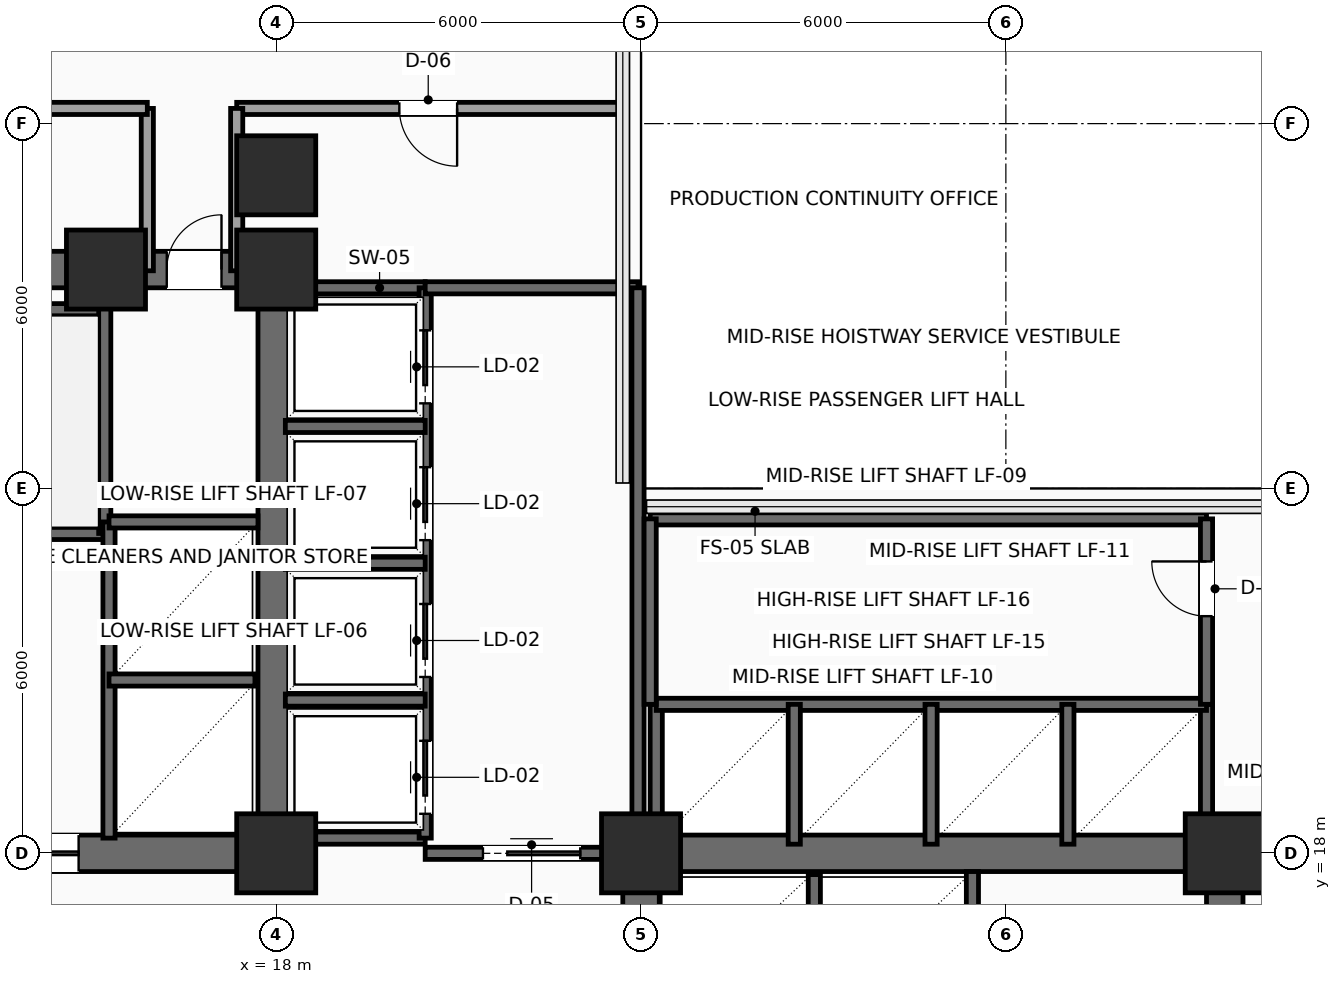
"""IFC4 building model, lengths in metres.
Left out: names, types, materials, properties, quantities, classifications, styles, units other than length and angle.
Written with IfcOpenShell. Run it as: python <this file> out.ifc"""

import sys

from ifc_helpers import new_model, si_unit, direction, frame, frame_2d, origin, origin_2d, place, context, subcontext, project, spatial, rectangle, extrude, element, fill, save


model = new_model("IFC4")
c1 = context("Model", 3, precision=1e-05, world=origin(), true_north=direction((0.0, 1.0)))
c2 = subcontext(c1, "Body", "Model", "MODEL_VIEW")
j1 = project(units=[si_unit("LENGTHUNIT", "METRE"), si_unit("PLANEANGLEUNIT", "RADIAN")], contexts=[c1])
p1 = place(None, origin())
s1 = spatial("IfcSite", under=j1, at=p1, CompositionType="ELEMENT")
p2 = place(p1, origin())
s2 = spatial("IfcBuilding", under=s1, at=p2, CompositionType="ELEMENT")
p3 = place(p2, frame((0.0, 0.0, 55.8)))
s3 = spatial("IfcBuildingStorey", under=s2, at=p3, CompositionType="ELEMENT", Elevation=55.8)
for number, where, z_axis, x_axis in (
    (1, (18.0, 18.0, 0.0), (0.0, 0.0, 1.0), (1.0, 0.0, 0.0)),
    (2, (15.2, 27.6, 0.0), (0.0, 0.0, 1.0), (1.0, 0.0, 0.0)),
    (3, (18.0, 27.6, 0.0), (0.0, 0.0, 1.0), (1.0, 0.0, 0.0)),
    (4, (24.0, 18.0, 0.0), (0.0, 0.0, 1.0), (1.0, 0.0, 0.0)),
    (5, (33.6, 18.0, 0.0), (0.0, 0.0, 1.0), (1.0, 0.0, 0.0)),
    (6, (18.0, 29.15, 0.0), (0.0, 0.0, 1.0), (1.0, 0.0, 0.0)),
):
    element("IfcColumn", number, at=place(p3, frame(where, z_axis=z_axis, x_axis=x_axis)), inside=s3, PredefinedType="COLUMN", context=c2, shape_type="SweptSolid", body=[
        extrude(rectangle(XDim=1.3, YDim=1.3, at=origin_2d()), origin(), (0.0, 0.0, 1.0), 3.9),
    ])
p4 = place(p3, frame((6.0, 18.0, 0.0), z_axis=(0.0, 0.0, 1.0), x_axis=(1.0, 0.0, 0.0)))
e7 = element("IfcWall", 7, at=p4, inside=s3, PredefinedType="SHEAR", context=c2, shape_type="SweptSolid", body=[
    extrude(rectangle(XDim=12.0, YDim=0.6, at=frame_2d((6.0, 0.0))), origin(), (0.0, 0.0, 1.0), 3.65),
])
p5 = place(p4, frame((7.15, 0.0, 0.0)))
e8 = element("IfcOpeningElement", 8, at=p5, cuts=e7, PredefinedType="OPENING", context=c2, shape_type="SweptSolid", body=[
    extrude(rectangle(XDim=1.6, YDim=2.3, at=frame_2d((0.8, 1.15))), frame((0.0, 0.31, 0.0), z_axis=(0.0, -1.0, 0.0), x_axis=(1.0, 0.0, 0.0)), (0.0, 0.0, 1.0), 0.62),
])
p6 = place(p3, frame((6.0, 27.6, 0.0), z_axis=(0.0, 0.0, 1.0), x_axis=(1.0, 0.0, 0.0)))
e9 = element("IfcWall", 9, at=p6, inside=s3, PredefinedType="SHEAR", context=c2, shape_type="SweptSolid", body=[
    extrude(rectangle(XDim=12.0, YDim=0.6, at=frame_2d((6.0, 0.0))), origin(), (0.0, 0.0, 1.0), 3.65),
])
p7 = place(p6, frame((10.2, 0.0, 0.0)))
e10 = element("IfcOpeningElement", 10, at=p7, cuts=e9, PredefinedType="OPENING", context=c2, shape_type="SweptSolid", body=[
    extrude(rectangle(XDim=0.9, YDim=2.15, at=frame_2d((0.45, 1.075))), frame((0.0, 0.31, 0.0), z_axis=(0.0, -1.0, 0.0), x_axis=(1.0, 0.0, 0.0)), (0.0, 0.0, 1.0), 0.62),
])
for number, where, z_axis, x_axis in (
    (11, (18.0, 18.0, 0.0), (0.0, 0.0, 1.0), (0.0, 1.0, 0.0)),
    (12, (24.0, 18.0, 0.0), (0.0, 0.0, 1.0), (1.0, 0.0, 0.0)),
):
    element("IfcWall", number, at=place(p3, frame(where, z_axis=z_axis, x_axis=x_axis)), inside=s3, PredefinedType="SHEAR", context=c2, shape_type="SweptSolid", body=[
        extrude(rectangle(XDim=9.6, YDim=0.6, at=frame_2d((4.8, 0.0))), origin(), (0.0, 0.0, 1.0), 3.65),
    ])
p8 = place(p3, frame((24.0, 6.0, 0.0), z_axis=(0.0, 0.0, 1.0), x_axis=(0.0, 1.0, 0.0)))
e13 = element("IfcWall", 13, at=p8, inside=s3, PredefinedType="SHEAR", context=c2, shape_type="SweptSolid", body=[
    extrude(rectangle(XDim=12.0, YDim=0.6, at=frame_2d((6.0, 0.0))), origin(), (0.0, 0.0, 1.0), 3.65),
])
p9 = place(p8, frame((7.15, 0.0, 0.0)))
e14 = element("IfcOpeningElement", 14, at=p9, cuts=e13, PredefinedType="OPENING", context=c2, shape_type="SweptSolid", body=[
    extrude(rectangle(XDim=1.6, YDim=2.3, at=frame_2d((0.8, 1.15))), frame((0.0, 0.31, 0.0), z_axis=(0.0, -1.0, 0.0), x_axis=(1.0, 0.0, 0.0)), (0.0, 0.0, 1.0), 0.62),
])
p10 = place(p3, frame((33.6, 6.0, 0.0), z_axis=(0.0, 0.0, 1.0), x_axis=(0.0, 1.0, 0.0)))
e15 = element("IfcWall", 15, at=p10, inside=s3, PredefinedType="SHEAR", context=c2, shape_type="SweptSolid", body=[
    extrude(rectangle(XDim=12.0, YDim=0.6, at=frame_2d((6.0, 0.0))), origin(), (0.0, 0.0, 1.0), 3.65),
])
p11 = place(p10, frame((10.2, 0.0, 0.0)))
e16 = element("IfcOpeningElement", 16, at=p11, cuts=e15, PredefinedType="OPENING", context=c2, shape_type="SweptSolid", body=[
    extrude(rectangle(XDim=0.9, YDim=2.15, at=frame_2d((0.45, 1.075))), frame((0.0, 0.31, 0.0), z_axis=(0.0, -1.0, 0.0), x_axis=(1.0, 0.0, 0.0)), (0.0, 0.0, 1.0), 0.62),
])
p12 = place(p3, frame((6.3, 23.26, 0.0), z_axis=(0.0, 0.0, 1.0), x_axis=(1.0, 0.0, 0.0)))
e17 = element("IfcWall", 17, at=p12, inside=s3, PredefinedType="SHEAR", context=c2, shape_type="SweptSolid", body=[
    extrude(rectangle(XDim=8.88, YDim=0.2, at=frame_2d((4.44, 0.0))), origin(), (0.0, 0.0, 1.0), 3.65),
])
p13 = place(p12, frame((0.35, 0.0, 0.0)))
e18 = element("IfcOpeningElement", 18, at=p13, cuts=e17, PredefinedType="OPENING", context=c2, shape_type="SweptSolid", body=[
    extrude(rectangle(XDim=1.1, YDim=2.2, at=frame_2d((0.55, 1.1))), frame((0.0, 0.11, 0.0), z_axis=(0.0, -1.0, 0.0), x_axis=(1.0, 0.0, 0.0)), (0.0, 0.0, 1.0), 0.22),
])
p14 = place(p3, frame((6.3, 26.94, 0.0), z_axis=(0.0, 0.0, 1.0), x_axis=(1.0, 0.0, 0.0)))
e19 = element("IfcWall", 19, at=p14, inside=s3, PredefinedType="SHEAR", context=c2, shape_type="SweptSolid", body=[
    extrude(rectangle(XDim=8.88, YDim=0.2, at=frame_2d((4.44, 0.0))), origin(), (0.0, 0.0, 1.0), 3.65),
])
p15 = place(p3, frame((15.18, 23.26, 0.0), z_axis=(0.0, 0.0, 1.0), x_axis=(0.0, 1.0, 0.0)))
e20 = element("IfcWall", 20, at=p15, inside=s3, PredefinedType="SHEAR", context=c2, shape_type="SweptSolid", body=[
    extrude(rectangle(XDim=4.04, YDim=0.2, at=frame_2d((2.02, 0.0))), origin(), (0.0, 0.0, 1.0), 3.65),
])
p16 = place(p3, frame((15.25, 18.25, 0.0), z_axis=(0.0, 0.0, 1.0), x_axis=(0.0, 1.0, 0.0)))
e21 = element("IfcWall", 21, at=p16, inside=s3, PredefinedType="SHEAR", context=c2, shape_type="SweptSolid", body=[
    extrude(rectangle(XDim=5.2, YDim=0.2, at=frame_2d((2.6, 0.0))), origin(), (0.0, 0.0, 1.0), 3.65),
])
p17 = place(p3, frame((15.25, 20.85, 0.0), z_axis=(0.0, 0.0, 1.0), x_axis=(1.0, 0.0, 0.0)))
e22 = element("IfcWall", 22, at=p17, inside=s3, PredefinedType="SHEAR", context=c2, shape_type="SweptSolid", body=[
    extrude(rectangle(XDim=2.4, YDim=0.2, at=frame_2d((1.2, 0.0))), origin(), (0.0, 0.0, 1.0), 3.65),
])
p18 = place(p3, frame((15.25, 23.45, 0.0), z_axis=(0.0, 0.0, 1.0), x_axis=(1.0, 0.0, 0.0)))
e23 = element("IfcWall", 23, at=p18, inside=s3, PredefinedType="SHEAR", context=c2, shape_type="SweptSolid", body=[
    extrude(rectangle(XDim=2.45, YDim=0.2, at=frame_2d((1.225, 0.0))), origin(), (0.0, 0.0, 1.0), 3.65),
])
p19 = place(p3, frame((26.85, 15.25, 0.0), z_axis=(0.0, 0.0, 1.0), x_axis=(0.0, 1.0, 0.0)))
e24 = element("IfcWall", 24, at=p19, inside=s3, PredefinedType="SHEAR", context=c2, shape_type="SweptSolid", body=[
    extrude(rectangle(XDim=2.4, YDim=0.2, at=frame_2d((1.2, 0.0))), origin(), (0.0, 0.0, 1.0), 3.65),
])
p20 = place(p3, frame((29.45, 15.25, 0.0), z_axis=(0.0, 0.0, 1.0), x_axis=(0.0, 1.0, 0.0)))
e25 = element("IfcWall", 25, at=p20, inside=s3, PredefinedType="SHEAR", context=c2, shape_type="SweptSolid", body=[
    extrude(rectangle(XDim=2.45, YDim=0.2, at=frame_2d((1.225, 0.0))), origin(), (0.0, 0.0, 1.0), 3.65),
])
for number, where, z_axis, x_axis in (
    (26, (18.1, 27.3, 0.0), (0.0, 0.0, 1.0), (1.0, 0.0, 0.0)),
    (27, (18.1, 18.25, 0.0), (0.0, 0.0, 1.0), (1.0, 0.0, 0.0)),
):
    element("IfcWall", number, at=place(p3, frame(where, z_axis=z_axis, x_axis=x_axis)), inside=s3, PredefinedType="SHEAR", context=c2, shape_type="SweptSolid", body=[
        extrude(rectangle(XDim=2.35, YDim=0.2, at=frame_2d((1.175, 0.0))), origin(), (0.0, 0.0, 1.0), 3.65),
    ])
p21 = place(p3, frame((20.45, 18.25, 0.0), z_axis=(0.0, 0.0, 1.0), x_axis=(0.0, 1.0, 0.0)))
e28 = element("IfcWall", 28, at=p21, inside=s3, PredefinedType="SHEAR", context=c2, shape_type="SweptSolid", body=[
    extrude(rectangle(XDim=9.05, YDim=0.2, at=frame_2d((4.525, 0.0))), origin(), (0.0, 0.0, 1.0), 3.65),
])
p22 = place(p21, frame((0.4, 0.0, 0.0)))
e29 = element("IfcOpeningElement", 29, at=p22, cuts=e28, PredefinedType="OPENING", context=c2, shape_type="SweptSolid", body=[
    extrude(rectangle(XDim=1.2, YDim=2.2, at=frame_2d((0.6, 1.1))), frame((0.0, 0.11, 0.0), z_axis=(0.0, -1.0, 0.0), x_axis=(1.0, 0.0, 0.0)), (0.0, 0.0, 1.0), 0.22),
])
p23 = place(p21, frame((2.65, 0.0, 0.0)))
e30 = element("IfcOpeningElement", 30, at=p23, cuts=e28, PredefinedType="OPENING", context=c2, shape_type="SweptSolid", body=[
    extrude(rectangle(XDim=1.2, YDim=2.2, at=frame_2d((0.6, 1.1))), frame((0.0, 0.11, 0.0), z_axis=(0.0, -1.0, 0.0), x_axis=(1.0, 0.0, 0.0)), (0.0, 0.0, 1.0), 0.22),
])
p24 = place(p21, frame((4.9, 0.0, 0.0)))
e31 = element("IfcOpeningElement", 31, at=p24, cuts=e28, PredefinedType="OPENING", context=c2, shape_type="SweptSolid", body=[
    extrude(rectangle(XDim=1.2, YDim=2.2, at=frame_2d((0.6, 1.1))), frame((0.0, 0.11, 0.0), z_axis=(0.0, -1.0, 0.0), x_axis=(1.0, 0.0, 0.0)), (0.0, 0.0, 1.0), 0.22),
])
p25 = place(p21, frame((7.15, 0.0, 0.0)))
e32 = element("IfcOpeningElement", 32, at=p25, cuts=e28, PredefinedType="OPENING", context=c2, shape_type="SweptSolid", body=[
    extrude(rectangle(XDim=1.2, YDim=2.2, at=frame_2d((0.6, 1.1))), frame((0.0, 0.11, 0.0), z_axis=(0.0, -1.0, 0.0), x_axis=(1.0, 0.0, 0.0)), (0.0, 0.0, 1.0), 0.22),
])
for number, where, z_axis, x_axis in (
    (33, (18.15, 20.52, 0.0), (0.0, 0.0, 1.0), (1.0, 0.0, 0.0)),
    (34, (18.15, 22.77, 0.0), (0.0, 0.0, 1.0), (1.0, 0.0, 0.0)),
    (35, (18.15, 25.02, 0.0), (0.0, 0.0, 1.0), (1.0, 0.0, 0.0)),
):
    element("IfcWall", number, at=place(p3, frame(where, z_axis=z_axis, x_axis=x_axis)), inside=s3, PredefinedType="SHEAR", context=c2, shape_type="SweptSolid", body=[
        extrude(rectangle(XDim=2.3, YDim=0.2, at=frame_2d((1.15, 0.0))), origin(), (0.0, 0.0, 1.0), 3.65),
    ])
p26 = place(p3, frame((20.45, 18.0, 0.0), z_axis=(0.0, 0.0, 1.0), x_axis=(1.0, 0.0, 0.0)))
e36 = element("IfcWall", 36, at=p26, inside=s3, PredefinedType="SHEAR", context=c2, shape_type="SweptSolid", body=[
    extrude(rectangle(XDim=3.5, YDim=0.2, at=frame_2d((1.75, 0.0))), origin(), (0.0, 0.0, 1.0), 3.65),
])
p27 = place(p26, frame((0.95, 0.0, 0.0)))
e37 = element("IfcOpeningElement", 37, at=p27, cuts=e36, PredefinedType="OPENING", context=c2, shape_type="SweptSolid", body=[
    extrude(rectangle(XDim=1.6, YDim=2.3, at=frame_2d((0.8, 1.15))), frame((0.0, 0.11, 0.0), z_axis=(0.0, -1.0, 0.0), x_axis=(1.0, 0.0, 0.0)), (0.0, 0.0, 1.0), 0.22),
])
p28 = place(p3, frame((20.45, 27.3, 0.0), z_axis=(0.0, 0.0, 1.0), x_axis=(1.0, 0.0, 0.0)))
e38 = element("IfcWall", 38, at=p28, inside=s3, PredefinedType="SHEAR", context=c2, shape_type="SweptSolid", body=[
    extrude(rectangle(XDim=3.5, YDim=0.2, at=frame_2d((1.75, 0.0))), origin(), (0.0, 0.0, 1.0), 3.65),
])
p29 = place(p3, frame((23.95, 18.0, 0.0), z_axis=(0.0, 0.0, 1.0), x_axis=(0.0, 1.0, 0.0)))
e39 = element("IfcWall", 39, at=p29, inside=s3, PredefinedType="SHEAR", context=c2, shape_type="SweptSolid", body=[
    extrude(rectangle(XDim=9.3, YDim=0.2, at=frame_2d((4.65, 0.0))), origin(), (0.0, 0.0, 1.0), 3.65),
])
for number, where, z_axis, x_axis in (
    (40, (33.3, 18.1, 0.0), (0.0, 0.0, 1.0), (0.0, 1.0, 0.0)),
    (41, (24.25, 18.1, 0.0), (0.0, 0.0, 1.0), (0.0, 1.0, 0.0)),
):
    element("IfcWall", number, at=place(p3, frame(where, z_axis=z_axis, x_axis=x_axis)), inside=s3, PredefinedType="SHEAR", context=c2, shape_type="SweptSolid", body=[
        extrude(rectangle(XDim=2.35, YDim=0.2, at=frame_2d((1.175, 0.0))), origin(), (0.0, 0.0, 1.0), 3.65),
    ])
p30 = place(p3, frame((24.25, 20.45, 0.0), z_axis=(0.0, 0.0, 1.0), x_axis=(1.0, 0.0, 0.0)))
e42 = element("IfcWall", 42, at=p30, inside=s3, PredefinedType="SHEAR", context=c2, shape_type="SweptSolid", body=[
    extrude(rectangle(XDim=9.05, YDim=0.2, at=frame_2d((4.525, 0.0))), origin(), (0.0, 0.0, 1.0), 3.65),
])
for number, where, z_axis, x_axis in (
    (43, (26.52, 18.15, 0.0), (0.0, 0.0, 1.0), (0.0, 1.0, 0.0)),
    (44, (28.77, 18.15, 0.0), (0.0, 0.0, 1.0), (0.0, 1.0, 0.0)),
    (45, (31.02, 18.15, 0.0), (0.0, 0.0, 1.0), (0.0, 1.0, 0.0)),
):
    element("IfcWall", number, at=place(p3, frame(where, z_axis=z_axis, x_axis=x_axis)), inside=s3, PredefinedType="SHEAR", context=c2, shape_type="SweptSolid", body=[
        extrude(rectangle(XDim=2.3, YDim=0.2, at=frame_2d((1.15, 0.0))), origin(), (0.0, 0.0, 1.0), 3.65),
    ])
p31 = place(p3, frame((24.15, 23.5, 0.0), z_axis=(0.0, 0.0, 1.0), x_axis=(1.0, 0.0, 0.0)))
e46 = element("IfcWall", 46, at=p31, inside=s3, PredefinedType="SHEAR", context=c2, shape_type="SweptSolid", body=[
    extrude(rectangle(XDim=9.15, YDim=0.2, at=frame_2d((4.575, 0.0))), origin(), (0.0, 0.0, 1.0), 3.65),
])
p32 = place(p3, frame((33.3, 20.45, 0.0), z_axis=(0.0, 0.0, 1.0), x_axis=(0.0, 1.0, 0.0)))
e47 = element("IfcWall", 47, at=p32, inside=s3, PredefinedType="SHEAR", context=c2, shape_type="SweptSolid", body=[
    extrude(rectangle(XDim=3.05, YDim=0.2, at=frame_2d((1.525, 0.0))), origin(), (0.0, 0.0, 1.0), 3.65),
])
p33 = place(p32, frame((1.45, 0.0, 0.0)))
e48 = element("IfcOpeningElement", 48, at=p33, cuts=e47, PredefinedType="OPENING", context=c2, shape_type="SweptSolid", body=[
    extrude(rectangle(XDim=0.9, YDim=2.15, at=frame_2d((0.45, 1.075))), frame((0.0, 0.11, 0.0), z_axis=(0.0, -1.0, 0.0), x_axis=(1.0, 0.0, 0.0)), (0.0, 0.0, 1.0), 0.22),
])
p34 = place(p3, frame((24.15, 20.45, 0.0), z_axis=(0.0, 0.0, 1.0), x_axis=(0.0, 1.0, 0.0)))
e49 = element("IfcWall", 49, at=p34, inside=s3, PredefinedType="SHEAR", context=c2, shape_type="SweptSolid", body=[
    extrude(rectangle(XDim=3.05, YDim=0.2, at=frame_2d((1.525, 0.0))), origin(), (0.0, 0.0, 1.0), 3.65),
])
p35 = place(p3, frame((23.7, 30.25, 0.0), z_axis=(0.0, 0.0, 1.0), x_axis=(-1.0, 0.0, 0.0)))
e50 = element("IfcWall", 50, at=p35, inside=s3, PredefinedType="SOLIDWALL", context=c2, shape_type="SweptSolid", body=[
    extrude(rectangle(XDim=6.35, YDim=0.2, at=frame_2d((3.175, 0.0))), origin(), (0.0, 0.0, 1.0), 3.65),
])
p36 = place(p35, frame((2.725, 0.0, 0.0)))
e51 = element("IfcOpeningElement", 51, at=p36, cuts=e50, PredefinedType="OPENING", context=c2, shape_type="SweptSolid", body=[
    extrude(rectangle(XDim=0.95, YDim=2.15, at=frame_2d((0.475, 1.075))), frame((0.0, 0.11, 0.0), z_axis=(0.0, -1.0, 0.0), x_axis=(1.0, 0.0, 0.0)), (0.0, 0.0, 1.0), 0.22),
])
for number, where, z_axis, x_axis in (
    (52, (17.35, 30.25, 0.0), (0.0, 0.0, 1.0), (0.0, -1.0, 0.0)),
    (53, (15.88, 27.58, 0.0), (0.0, 0.0, 1.0), (0.0, 1.0, 0.0)),
):
    element("IfcWall", number, at=place(p3, frame(where, z_axis=z_axis, x_axis=x_axis)), inside=s3, PredefinedType="SOLIDWALL", context=c2, shape_type="SweptSolid", body=[
        extrude(rectangle(XDim=2.67, YDim=0.2, at=frame_2d((1.335, 0.0))), origin(), (0.0, 0.0, 1.0), 3.65),
    ])
p37 = place(p3, frame((15.88, 30.25, 0.0), z_axis=(0.0, 0.0, 1.0), x_axis=(-1.0, 0.0, 0.0)))
e54 = element("IfcWall", 54, at=p37, inside=s3, PredefinedType="SOLIDWALL", context=c2, shape_type="SweptSolid", body=[
    extrude(rectangle(XDim=10.63, YDim=0.2, at=frame_2d((5.315, 0.0))), origin(), (0.0, 0.0, 1.0), 3.65),
])
p38 = place(p37, frame((6.13, 0.0, 0.0)))
e55 = element("IfcOpeningElement", 55, at=p38, cuts=e54, PredefinedType="OPENING", context=c2, shape_type="SweptSolid", body=[
    extrude(rectangle(XDim=0.9, YDim=2.1, at=frame_2d((0.45, 1.05))), frame((0.0, 0.11, 0.0), z_axis=(0.0, -1.0, 0.0), x_axis=(1.0, 0.0, 0.0)), (0.0, 0.0, 1.0), 0.22),
])
p39 = place(p5, origin())
e56 = element("IfcDoor", 56, at=p39, inside=s3, OperationType="DOUBLE_DOOR_SLIDING", PredefinedType="DOOR", context=c2, shape_type="SweptSolid", body=[
    extrude(rectangle(XDim=1.6, YDim=2.3, at=frame_2d((0.8, 1.15))), frame((0.0, 0.025, 0.0), z_axis=(0.0, -1.0, 0.0), x_axis=(1.0, 0.0, 0.0)), (0.0, 0.0, 1.0), 0.05),
])
fill(e8, e56)
p40 = place(p7, origin())
e57 = element("IfcDoor", 57, at=p40, inside=s3, OperationType="SINGLE_SWING_RIGHT", PredefinedType="DOOR", context=c2, shape_type="SweptSolid", body=[
    extrude(rectangle(XDim=0.9, YDim=2.15, at=frame_2d((0.45, 1.075))), frame((0.0, 0.025, 0.0), z_axis=(0.0, -1.0, 0.0), x_axis=(1.0, 0.0, 0.0)), (0.0, 0.0, 1.0), 0.05),
])
fill(e10, e57)
p41 = place(p22, origin())
e58 = element("IfcDoor", 58, at=p41, inside=s3, OperationType="SLIDING_TO_RIGHT", PredefinedType="DOOR", context=c2, shape_type="SweptSolid", body=[
    extrude(rectangle(XDim=1.2, YDim=2.2, at=frame_2d((0.6, 1.1))), frame((0.0, 0.025, 0.0), z_axis=(0.0, -1.0, 0.0), x_axis=(1.0, 0.0, 0.0)), (0.0, 0.0, 1.0), 0.05),
])
fill(e29, e58)
p42 = place(p23, origin())
e59 = element("IfcDoor", 59, at=p42, inside=s3, OperationType="SLIDING_TO_RIGHT", PredefinedType="DOOR", context=c2, shape_type="SweptSolid", body=[
    extrude(rectangle(XDim=1.2, YDim=2.2, at=frame_2d((0.6, 1.1))), frame((0.0, 0.025, 0.0), z_axis=(0.0, -1.0, 0.0), x_axis=(1.0, 0.0, 0.0)), (0.0, 0.0, 1.0), 0.05),
])
fill(e30, e59)
p43 = place(p24, origin())
e60 = element("IfcDoor", 60, at=p43, inside=s3, OperationType="SLIDING_TO_RIGHT", PredefinedType="DOOR", context=c2, shape_type="SweptSolid", body=[
    extrude(rectangle(XDim=1.2, YDim=2.2, at=frame_2d((0.6, 1.1))), frame((0.0, 0.025, 0.0), z_axis=(0.0, -1.0, 0.0), x_axis=(1.0, 0.0, 0.0)), (0.0, 0.0, 1.0), 0.05),
])
fill(e31, e60)
p44 = place(p25, origin())
e61 = element("IfcDoor", 61, at=p44, inside=s3, OperationType="SLIDING_TO_RIGHT", PredefinedType="DOOR", context=c2, shape_type="SweptSolid", body=[
    extrude(rectangle(XDim=1.2, YDim=2.2, at=frame_2d((0.6, 1.1))), frame((0.0, 0.025, 0.0), z_axis=(0.0, -1.0, 0.0), x_axis=(1.0, 0.0, 0.0)), (0.0, 0.0, 1.0), 0.05),
])
fill(e32, e61)
p45 = place(p27, origin())
e62 = element("IfcDoor", 62, at=p45, inside=s3, OperationType="DOUBLE_DOOR_SLIDING", PredefinedType="DOOR", context=c2, shape_type="SweptSolid", body=[
    extrude(rectangle(XDim=1.6, YDim=2.3, at=frame_2d((0.8, 1.15))), frame((0.0, 0.025, 0.0), z_axis=(0.0, -1.0, 0.0), x_axis=(1.0, 0.0, 0.0)), (0.0, 0.0, 1.0), 0.05),
])
fill(e37, e62)
p46 = place(p33, origin())
e63 = element("IfcDoor", 63, at=p46, inside=s3, OperationType="SINGLE_SWING_RIGHT", PredefinedType="DOOR", context=c2, shape_type="SweptSolid", body=[
    extrude(rectangle(XDim=0.9, YDim=2.15, at=frame_2d((0.45, 1.075))), frame((0.0, 0.025, 0.0), z_axis=(0.0, -1.0, 0.0), x_axis=(1.0, 0.0, 0.0)), (0.0, 0.0, 1.0), 0.05),
])
fill(e48, e63)
p47 = place(p36, origin())
e64 = element("IfcDoor", 64, at=p47, inside=s3, OperationType="SINGLE_SWING_LEFT", PredefinedType="DOOR", context=c2, shape_type="SweptSolid", body=[
    extrude(rectangle(XDim=0.95, YDim=2.15, at=frame_2d((0.475, 1.075))), frame((0.0, 0.025, 0.0), z_axis=(0.0, -1.0, 0.0), x_axis=(1.0, 0.0, 0.0)), (0.0, 0.0, 1.0), 0.05),
])
fill(e51, e64)
save(model, sys.argv[1])
